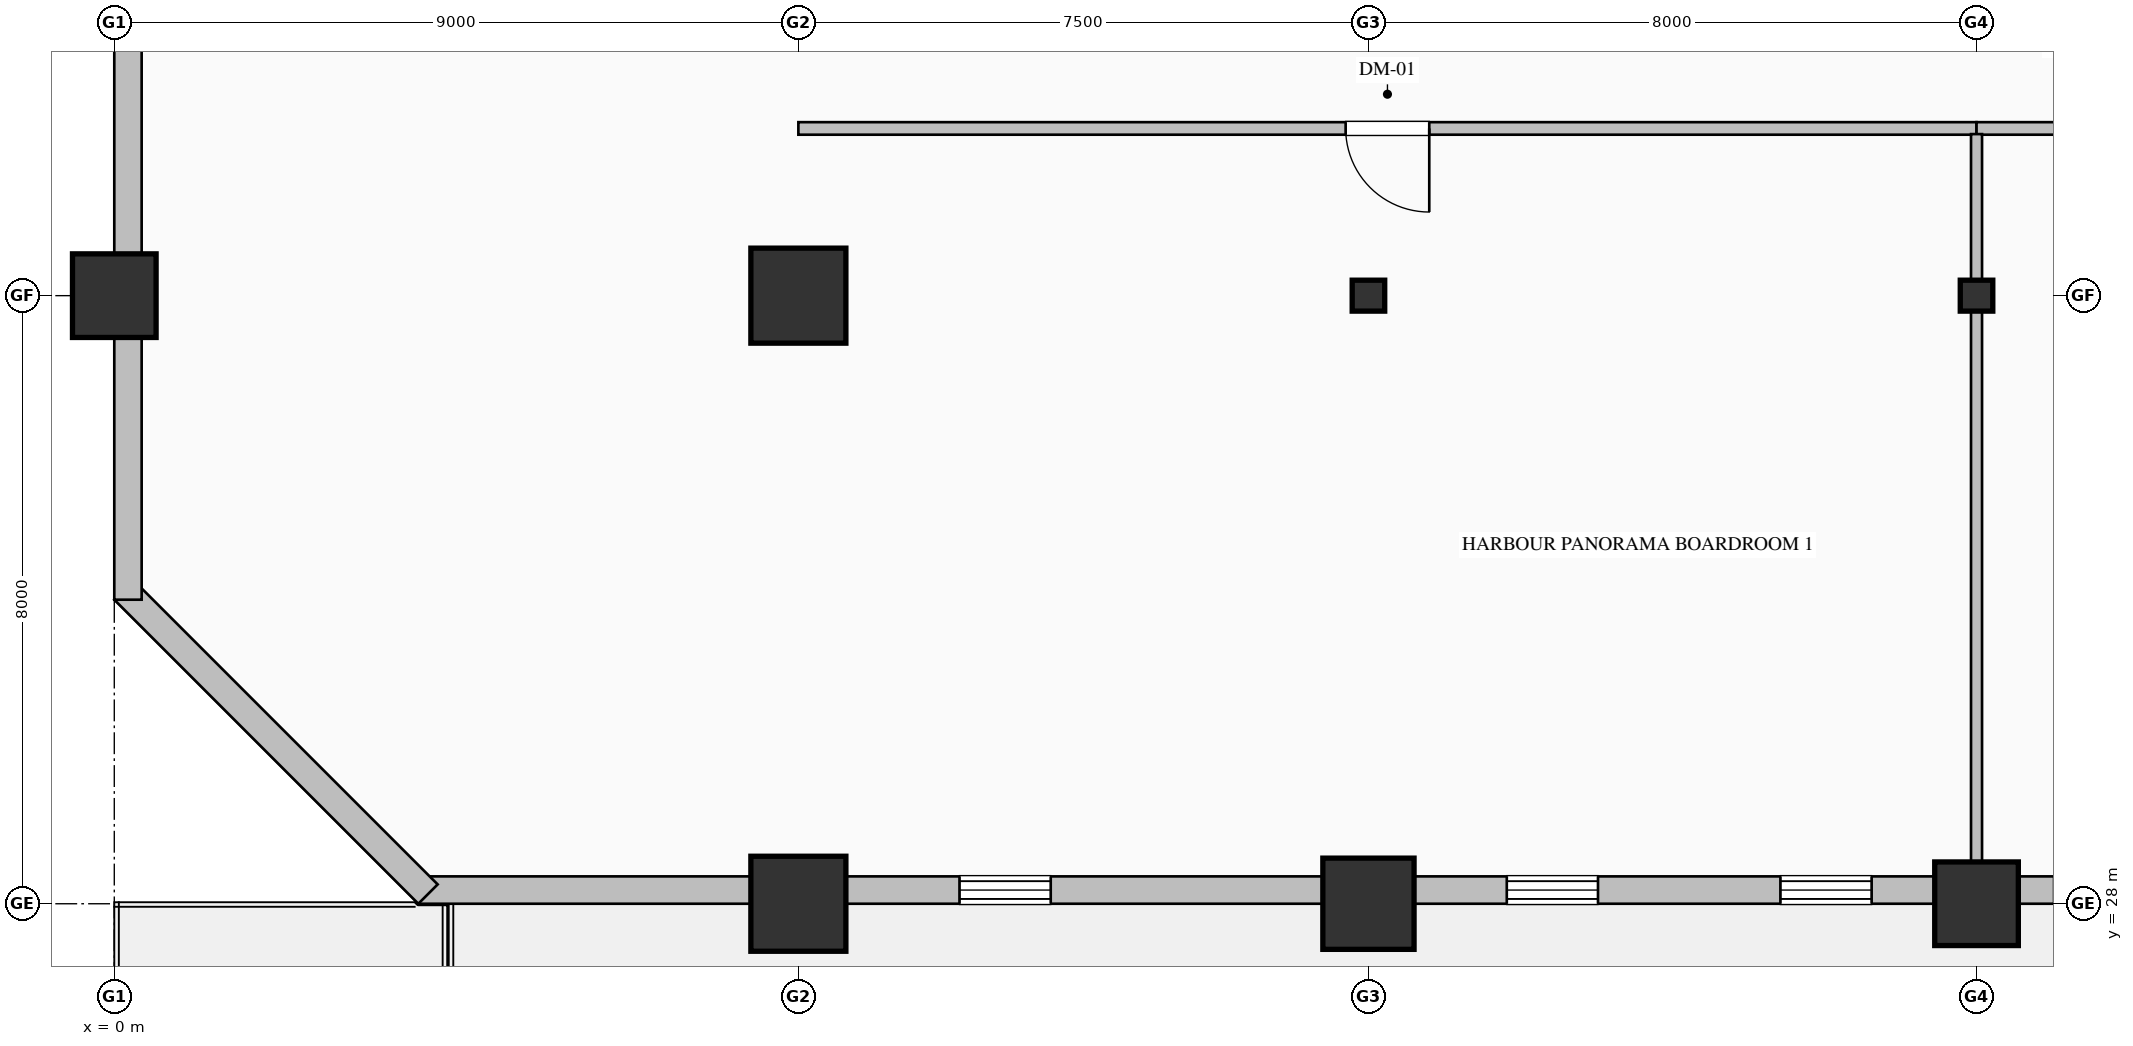
"""IFC4 building model, lengths in metres.
Left out: names, types, materials, properties, quantities, classifications, styles, units other than length and angle.
Written with IfcOpenShell. Run it as: python <this file> out.ifc"""

import sys

from ifc_helpers import new_model, si_unit, direction, frame, frame_2d, origin, origin_2d, place, context, subcontext, project, spatial, rectangle, hollow_rectangle, hollow_circle, i_section, extrude, element, fill, save


model = new_model("IFC4")
c1 = context("Model", 3, precision=1e-05, world=origin(), true_north=direction((0.0, 1.0)))
c2 = subcontext(c1, "Body", "Model", "MODEL_VIEW")
j1 = project(units=[si_unit("LENGTHUNIT", "METRE"), si_unit("PLANEANGLEUNIT", "RADIAN")], contexts=[c1])
p1 = place(None, origin())
s1 = spatial("IfcSite", under=j1, at=p1, CompositionType="ELEMENT")
p2 = place(p1, origin())
s2 = spatial("IfcBuilding", under=s1, at=p2, CompositionType="ELEMENT")
p3 = place(p2, frame((0.0, 0.0, 28.2)))
s3 = spatial("IfcBuildingStorey", under=s2, at=p3, CompositionType="ELEMENT", Elevation=28.2)
p4 = place(p3, frame((0.0, 36.0, 0.0), z_axis=(0.0, 0.0, 1.0), x_axis=(1.0, 0.0, 0.0)))
e1 = element("IfcColumn", 1, at=p4, inside=s3, PredefinedType="COLUMN", context=c2, shape_type="SweptSolid", body=[
    extrude(hollow_rectangle(XDim=1.1, YDim=1.1, WallThickness=0.04, at=origin_2d()), origin(), (0.0, 0.0, 1.0), 4.0),
])
for number, where, z_axis, x_axis in (
    (2, (9.0, 28.0, 0.0), (0.0, 0.0, 1.0), (1.0, 0.0, 0.0)),
    (3, (9.0, 36.0, 0.0), (0.0, 0.0, 1.0), (1.0, 0.0, 0.0)),
):
    element("IfcColumn", number, at=place(p3, frame(where, z_axis=z_axis, x_axis=x_axis)), inside=s3, PredefinedType="COLUMN", context=c2, shape_type="SweptSolid", body=[
        extrude(hollow_rectangle(XDim=1.25, YDim=1.25, WallThickness=0.045, at=origin_2d()), origin(), (0.0, 0.0, 1.0), 4.0),
    ])
p5 = place(p3, frame((16.5, 28.0, 0.0), z_axis=(0.0, 0.0, 1.0), x_axis=(1.0, 0.0, 0.0)))
e4 = element("IfcColumn", 4, at=p5, inside=s3, PredefinedType="COLUMN", context=c2, shape_type="SweptSolid", body=[
    extrude(hollow_circle(Radius=0.6, WallThickness=0.04, at=origin_2d()), origin(), (0.0, 0.0, 1.0), 4.0),
])
p6 = place(p3, frame((16.5, 36.0, 0.0), z_axis=(0.0, 0.0, 1.0), x_axis=(1.0, 0.0, 0.0)))
e5 = element("IfcColumn", 5, at=p6, inside=s3, PredefinedType="COLUMN", context=c2, shape_type="SweptSolid", body=[
    extrude(i_section(OverallWidth=0.407, OverallDepth=0.428, WebThickness=0.02, FlangeThickness=0.035, FilletRadius=0.022, at=origin_2d()), origin(), (0.0, 0.0, 1.0), 4.0),
])
p7 = place(p3, frame((24.5, 28.0, 0.0), z_axis=(0.0, 0.0, 1.0), x_axis=(1.0, 0.0, 0.0)))
e6 = element("IfcColumn", 6, at=p7, inside=s3, PredefinedType="COLUMN", context=c2, shape_type="SweptSolid", body=[
    extrude(hollow_rectangle(XDim=1.1, YDim=1.1, WallThickness=0.04, at=origin_2d()), origin(), (0.0, 0.0, 1.0), 4.0),
])
p8 = place(p3, frame((24.5, 36.0, 0.0), z_axis=(0.0, 0.0, 1.0), x_axis=(1.0, 0.0, 0.0)))
e7 = element("IfcColumn", 7, at=p8, inside=s3, PredefinedType="COLUMN", context=c2, shape_type="SweptSolid", body=[
    extrude(i_section(OverallWidth=0.407, OverallDepth=0.428, WebThickness=0.02, FlangeThickness=0.035, FilletRadius=0.022, at=origin_2d()), origin(), (0.0, 0.0, 1.0), 4.0),
])
p9 = place(p3, frame((40.52, 28.18, 0.0), z_axis=(0.0, 0.0, 1.0), x_axis=(-1.0, 0.0, 0.0)))
e8 = element("IfcWall", 8, at=p9, inside=s3, PredefinedType="SOLIDWALL", context=c2, shape_type="SweptSolid", body=[
    extrude(rectangle(XDim=36.52, YDim=0.36, at=frame_2d((18.26, 0.0))), origin(), (0.0, 0.0, 1.0), 3.05),
])
p10 = place(p9, frame((13.8, 0.0, 0.7)))
e9 = element("IfcOpeningElement", 9, at=p10, cuts=e8, PredefinedType="OPENING", context=c2, shape_type="SweptSolid", body=[
    extrude(rectangle(XDim=1.2, YDim=1.85, at=frame_2d((0.6, 0.925))), frame((0.0, 0.19, 0.0), z_axis=(0.0, -1.0, 0.0), x_axis=(1.0, 0.0, 0.0)), (0.0, 0.0, 1.0), 0.38),
])
p11 = place(p9, frame((17.4, 0.0, 0.7)))
e10 = element("IfcOpeningElement", 10, at=p11, cuts=e8, PredefinedType="OPENING", context=c2, shape_type="SweptSolid", body=[
    extrude(rectangle(XDim=1.2, YDim=1.85, at=frame_2d((0.6, 0.925))), frame((0.0, 0.19, 0.0), z_axis=(0.0, -1.0, 0.0), x_axis=(1.0, 0.0, 0.0)), (0.0, 0.0, 1.0), 0.38),
])
p12 = place(p9, frame((21.0, 0.0, 0.7)))
e11 = element("IfcOpeningElement", 11, at=p12, cuts=e8, PredefinedType="OPENING", context=c2, shape_type="SweptSolid", body=[
    extrude(rectangle(XDim=1.2, YDim=1.85, at=frame_2d((0.6, 0.925))), frame((0.0, 0.19, 0.0), z_axis=(0.0, -1.0, 0.0), x_axis=(1.0, 0.0, 0.0)), (0.0, 0.0, 1.0), 0.38),
])
p13 = place(p9, frame((28.2, 0.0, 0.7)))
e12 = element("IfcOpeningElement", 12, at=p13, cuts=e8, PredefinedType="OPENING", context=c2, shape_type="SweptSolid", body=[
    extrude(rectangle(XDim=1.2, YDim=1.85, at=frame_2d((0.6, 0.925))), frame((0.0, 0.19, 0.0), z_axis=(0.0, -1.0, 0.0), x_axis=(1.0, 0.0, 0.0)), (0.0, 0.0, 1.0), 0.38),
])
p14 = place(p9, frame((11.395, 0.0, 0.0)))
e13 = element("IfcOpeningElement", 13, at=p14, cuts=e8, PredefinedType="OPENING", context=c2, shape_type="SweptSolid", body=[
    extrude(rectangle(XDim=1.25, YDim=2.25, at=frame_2d((0.625, 1.125))), frame((0.0, 0.19, 0.0), z_axis=(0.0, -1.0, 0.0), x_axis=(1.0, 0.0, 0.0)), (0.0, 0.0, 1.0), 0.38),
])
p15 = place(p3, frame((4.127, 28.127, 0.0), z_axis=(0.0, 0.0, 1.0), x_axis=(-0.707106781187, 0.707106781187, 0.0)))
e14 = element("IfcWall", 14, at=p15, inside=s3, PredefinedType="SOLIDWALL", context=c2, shape_type="SweptSolid", body=[
    extrude(rectangle(XDim=5.657, YDim=0.36, at=frame_2d((2.828, 0.0))), origin(), (0.0, 0.0, 1.0), 3.75),
])
p16 = place(p3, frame((0.18, 32.0, 0.0), z_axis=(0.0, 0.0, 1.0), x_axis=(0.0, 1.0, 0.0)))
e15 = element("IfcWall", 15, at=p16, inside=s3, PredefinedType="SOLIDWALL", context=c2, shape_type="SweptSolid", body=[
    extrude(rectangle(XDim=16.0, YDim=0.36, at=frame_2d((8.0, 0.0))), origin(), (0.0, 0.0, 1.0), 3.25),
])
p17 = place(p3, frame((24.5, 38.2, 0.0), z_axis=(0.0, 0.0, 1.0), x_axis=(-1.0, 0.0, 0.0)))
e16 = element("IfcWall", 16, at=p17, inside=s3, PredefinedType="PARTITIONING", context=c2, shape_type="SweptSolid", body=[
    extrude(rectangle(XDim=15.5, YDim=0.165, at=frame_2d((7.75, 0.0))), origin(), (0.0, 0.0, 1.0), 3.75),
])
p18 = place(p17, frame((7.2, 0.0, 0.0)))
e17 = element("IfcOpeningElement", 17, at=p18, cuts=e16, PredefinedType="OPENING", context=c2, shape_type="SweptSolid", body=[
    extrude(rectangle(XDim=1.1, YDim=2.2, at=frame_2d((0.55, 1.1))), frame((0.0, 0.093, 0.0), z_axis=(0.0, -1.0, 0.0), x_axis=(1.0, 0.0, 0.0)), (0.0, 0.0, 1.0), 0.185),
])
p19 = place(p3, frame((37.8, 38.2, 0.0), z_axis=(0.0, 0.0, 1.0), x_axis=(-1.0, 0.0, 0.0)))
e18 = element("IfcWall", 18, at=p19, inside=s3, PredefinedType="PARTITIONING", context=c2, shape_type="SweptSolid", body=[
    extrude(rectangle(XDim=13.3, YDim=0.165, at=frame_2d((6.65, 0.0))), origin(), (0.0, 0.0, 1.0), 3.75),
])
p20 = place(p19, frame((6.15, 0.0, 0.0)))
e19 = element("IfcOpeningElement", 19, at=p20, cuts=e18, PredefinedType="OPENING", context=c2, shape_type="SweptSolid", body=[
    extrude(rectangle(XDim=1.0, YDim=2.15, at=frame_2d((0.5, 1.075))), frame((0.0, 0.093, 0.0), z_axis=(0.0, -1.0, 0.0), x_axis=(1.0, 0.0, 0.0)), (0.0, 0.0, 1.0), 0.185),
])
p21 = place(p3, frame((24.5, 38.125, 0.0), z_axis=(0.0, 0.0, 1.0), x_axis=(0.0, -1.0, 0.0)))
e20 = element("IfcWall", 20, at=p21, inside=s3, PredefinedType="PARTITIONING", context=c2, shape_type="SweptSolid", body=[
    extrude(rectangle(XDim=9.773, YDim=0.145, at=frame_2d((4.887, 0.0))), origin(), (0.0, 0.0, 1.0), 3.042),
])
p22 = place(p11, origin())
e21 = element("IfcWindow", 21, at=p22, inside=s3, PartitioningType="DOUBLE_PANEL_VERTICAL", PredefinedType="WINDOW", context=c2, shape_type="SweptSolid", body=[
    extrude(rectangle(XDim=1.2, YDim=1.85, at=frame_2d((0.6, 0.925))), frame((0.0, 0.15, 0.0), z_axis=(0.0, -1.0, 0.0), x_axis=(1.0, 0.0, 0.0)), (0.0, 0.0, 1.0), 0.06),
])
fill(e10, e21)
p23 = place(p12, origin())
e22 = element("IfcWindow", 22, at=p23, inside=s3, PartitioningType="DOUBLE_PANEL_VERTICAL", PredefinedType="WINDOW", context=c2, shape_type="SweptSolid", body=[
    extrude(rectangle(XDim=1.2, YDim=1.85, at=frame_2d((0.6, 0.925))), frame((0.0, 0.15, 0.0), z_axis=(0.0, -1.0, 0.0), x_axis=(1.0, 0.0, 0.0)), (0.0, 0.0, 1.0), 0.06),
])
fill(e11, e22)
p24 = place(p13, origin())
e23 = element("IfcWindow", 23, at=p24, inside=s3, PartitioningType="DOUBLE_PANEL_VERTICAL", PredefinedType="WINDOW", context=c2, shape_type="SweptSolid", body=[
    extrude(rectangle(XDim=1.2, YDim=1.85, at=frame_2d((0.6, 0.925))), frame((0.0, 0.15, 0.0), z_axis=(0.0, -1.0, 0.0), x_axis=(1.0, 0.0, 0.0)), (0.0, 0.0, 1.0), 0.06),
])
fill(e12, e23)
p25 = place(p18, origin())
e24 = element("IfcDoor", 24, at=p25, inside=s3, OperationType="SINGLE_SWING_LEFT", PredefinedType="DOOR", context=c2, shape_type="SweptSolid", body=[
    extrude(rectangle(XDim=1.1, YDim=2.2, at=frame_2d((0.55, 1.1))), frame((0.0, 0.025, 0.0), z_axis=(0.0, -1.0, 0.0), x_axis=(1.0, 0.0, 0.0)), (0.0, 0.0, 1.0), 0.05),
])
fill(e17, e24)
save(model, sys.argv[1])
